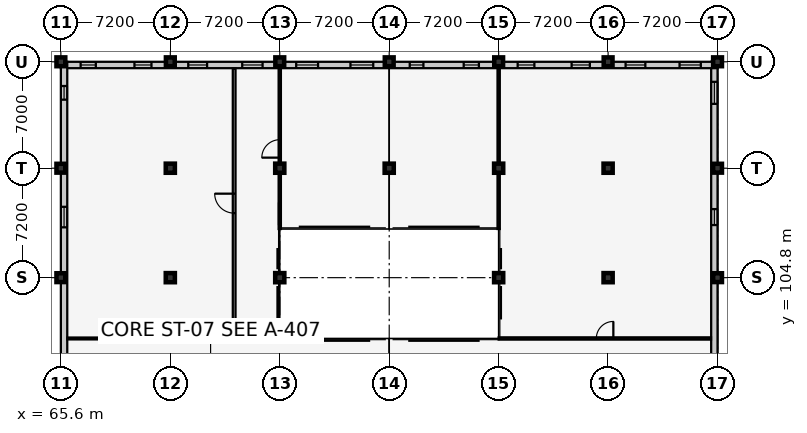
"""IFC4 building model, lengths in metres.
Left out: names, types, materials, properties, quantities, classifications, styles, units other than length and angle.
Written with IfcOpenShell. Run it as: python <this file> out.ifc"""

import sys

from ifc_helpers import new_model, si_unit, direction, frame, frame_2d, origin, origin_2d, place, context, subcontext, project, spatial, rectangle, extrude, element, fill, save


model = new_model("IFC4")
c1 = context("Model", 3, precision=1e-05, world=origin(), true_north=direction((0.0, 1.0)))
c2 = subcontext(c1, "Body", "Model", "MODEL_VIEW")
j1 = project(units=[si_unit("LENGTHUNIT", "METRE"), si_unit("PLANEANGLEUNIT", "RADIAN")], contexts=[c1])
p1 = place(None, origin())
s1 = spatial("IfcSite", under=j1, at=p1, CompositionType="ELEMENT")
p2 = place(p1, origin())
s2 = spatial("IfcBuilding", under=s1, at=p2, CompositionType="ELEMENT")
p3 = place(p2, frame((0.0, 0.0, 9.6)))
s3 = spatial("IfcBuildingStorey", under=s2, at=p3, CompositionType="ELEMENT", Elevation=9.6)
for number, where, z_axis, x_axis in (
    (1, (65.6, 104.8, 0.0), (0.0, 0.0, 1.0), (1.0, 0.0, 0.0)),
    (2, (65.6, 112.0, 0.0), (0.0, 0.0, 1.0), (1.0, 0.0, 0.0)),
    (3, (65.6, 119.0, 0.0), (0.0, 0.0, 1.0), (1.0, 0.0, 0.0)),
):
    element("IfcColumn", number, at=place(p3, frame(where, z_axis=z_axis, x_axis=x_axis)), inside=s3, PredefinedType="COLUMN", context=c2, shape_type="SweptSolid", body=[
        extrude(rectangle(XDim=0.58, YDim=0.58, at=origin_2d()), origin(), (0.0, 0.0, 1.0), 4.2),
    ])
for number, where, z_axis, x_axis in (
    (4, (72.8, 104.8, 0.0), (0.0, 0.0, 1.0), (1.0, 0.0, 0.0)),
    (5, (72.8, 112.0, 0.0), (0.0, 0.0, 1.0), (1.0, 0.0, 0.0)),
):
    element("IfcColumn", number, at=place(p3, frame(where, z_axis=z_axis, x_axis=x_axis)), inside=s3, PredefinedType="COLUMN", context=c2, shape_type="SweptSolid", body=[
        extrude(rectangle(XDim=0.6, YDim=0.6, at=origin_2d()), origin(), (0.0, 0.0, 1.0), 4.2),
    ])
p4 = place(p3, frame((72.8, 119.0, 0.0), z_axis=(0.0, 0.0, 1.0), x_axis=(1.0, 0.0, 0.0)))
e6 = element("IfcColumn", 6, at=p4, inside=s3, PredefinedType="COLUMN", context=c2, shape_type="SweptSolid", body=[
    extrude(rectangle(XDim=0.58, YDim=0.58, at=origin_2d()), origin(), (0.0, 0.0, 1.0), 4.2),
])
for number, where, z_axis, x_axis in (
    (7, (80.0, 104.8, 0.0), (0.0, 0.0, 1.0), (1.0, 0.0, 0.0)),
    (8, (80.0, 112.0, 0.0), (0.0, 0.0, 1.0), (1.0, 0.0, 0.0)),
):
    element("IfcColumn", number, at=place(p3, frame(where, z_axis=z_axis, x_axis=x_axis)), inside=s3, PredefinedType="COLUMN", context=c2, shape_type="SweptSolid", body=[
        extrude(rectangle(XDim=0.6, YDim=0.6, at=origin_2d()), origin(), (0.0, 0.0, 1.0), 4.2),
    ])
p5 = place(p3, frame((80.0, 119.0, 0.0), z_axis=(0.0, 0.0, 1.0), x_axis=(1.0, 0.0, 0.0)))
e9 = element("IfcColumn", 9, at=p5, inside=s3, PredefinedType="COLUMN", context=c2, shape_type="SweptSolid", body=[
    extrude(rectangle(XDim=0.58, YDim=0.58, at=origin_2d()), origin(), (0.0, 0.0, 1.0), 4.2),
])
p6 = place(p3, frame((87.2, 112.0, 0.0), z_axis=(0.0, 0.0, 1.0), x_axis=(1.0, 0.0, 0.0)))
e10 = element("IfcColumn", 10, at=p6, inside=s3, PredefinedType="COLUMN", context=c2, shape_type="SweptSolid", body=[
    extrude(rectangle(XDim=0.6, YDim=0.6, at=origin_2d()), origin(), (0.0, 0.0, 1.0), 4.2),
])
p7 = place(p3, frame((87.2, 119.0, 0.0), z_axis=(0.0, 0.0, 1.0), x_axis=(1.0, 0.0, 0.0)))
e11 = element("IfcColumn", 11, at=p7, inside=s3, PredefinedType="COLUMN", context=c2, shape_type="SweptSolid", body=[
    extrude(rectangle(XDim=0.58, YDim=0.58, at=origin_2d()), origin(), (0.0, 0.0, 1.0), 4.2),
])
for number, where, z_axis, x_axis in (
    (12, (94.4, 104.8, 0.0), (0.0, 0.0, 1.0), (1.0, 0.0, 0.0)),
    (13, (94.4, 112.0, 0.0), (0.0, 0.0, 1.0), (1.0, 0.0, 0.0)),
):
    element("IfcColumn", number, at=place(p3, frame(where, z_axis=z_axis, x_axis=x_axis)), inside=s3, PredefinedType="COLUMN", context=c2, shape_type="SweptSolid", body=[
        extrude(rectangle(XDim=0.6, YDim=0.6, at=origin_2d()), origin(), (0.0, 0.0, 1.0), 4.2),
    ])
p8 = place(p3, frame((94.4, 119.0, 0.0), z_axis=(0.0, 0.0, 1.0), x_axis=(1.0, 0.0, 0.0)))
e14 = element("IfcColumn", 14, at=p8, inside=s3, PredefinedType="COLUMN", context=c2, shape_type="SweptSolid", body=[
    extrude(rectangle(XDim=0.58, YDim=0.58, at=origin_2d()), origin(), (0.0, 0.0, 1.0), 4.2),
])
for number, where, z_axis, x_axis in (
    (15, (101.6, 104.8, 0.0), (0.0, 0.0, 1.0), (1.0, 0.0, 0.0)),
    (16, (101.6, 112.0, 0.0), (0.0, 0.0, 1.0), (1.0, 0.0, 0.0)),
):
    element("IfcColumn", number, at=place(p3, frame(where, z_axis=z_axis, x_axis=x_axis)), inside=s3, PredefinedType="COLUMN", context=c2, shape_type="SweptSolid", body=[
        extrude(rectangle(XDim=0.6, YDim=0.6, at=origin_2d()), origin(), (0.0, 0.0, 1.0), 4.2),
    ])
for number, where, z_axis, x_axis in (
    (17, (101.6, 119.0, 0.0), (0.0, 0.0, 1.0), (1.0, 0.0, 0.0)),
    (18, (108.8, 104.8, 0.0), (0.0, 0.0, 1.0), (1.0, 0.0, 0.0)),
    (19, (108.8, 112.0, 0.0), (0.0, 0.0, 1.0), (1.0, 0.0, 0.0)),
    (20, (108.8, 119.0, 0.0), (0.0, 0.0, 1.0), (1.0, 0.0, 0.0)),
):
    element("IfcColumn", number, at=place(p3, frame(where, z_axis=z_axis, x_axis=x_axis)), inside=s3, PredefinedType="COLUMN", context=c2, shape_type="SweptSolid", body=[
        extrude(rectangle(XDim=0.58, YDim=0.58, at=origin_2d()), origin(), (0.0, 0.0, 1.0), 4.2),
    ])
p9 = place(p3, frame((108.59, 119.0, 0.0), z_axis=(0.0, 0.0, 1.0), x_axis=(0.0, -1.0, 0.0)))
e21 = element("IfcWall", 21, at=p9, inside=s3, PredefinedType="SOLIDWALL", context=c2, shape_type="SweptSolid", body=[
    extrude(rectangle(XDim=28.6, YDim=0.42, at=frame_2d((14.3, 0.0))), origin(), (0.0, 0.0, 1.0), 3.345),
])
p10 = place(p9, frame((1.318, 0.0, 0.9)))
e22 = element("IfcOpeningElement", 22, at=p10, cuts=e21, PredefinedType="OPENING", context=c2, shape_type="SweptSolid", body=[
    extrude(rectangle(XDim=1.45, YDim=1.45, at=frame_2d((0.725, 0.725))), frame((0.0, 0.222, 0.0), z_axis=(0.0, -1.0, 0.0), x_axis=(1.0, 0.0, 0.0)), (0.0, 0.0, 1.0), 0.444),
])
p11 = place(p9, frame((9.689, 0.0, 0.9)))
e23 = element("IfcOpeningElement", 23, at=p11, cuts=e21, PredefinedType="OPENING", context=c2, shape_type="SweptSolid", body=[
    extrude(rectangle(XDim=1.05, YDim=1.6, at=frame_2d((0.525, 0.8))), frame((0.0, 0.222, 0.0), z_axis=(0.0, -1.0, 0.0), x_axis=(1.0, 0.0, 0.0)), (0.0, 0.0, 1.0), 0.444),
])
p12 = place(p9, frame((25.807, 0.0, 0.9)))
e24 = element("IfcOpeningElement", 24, at=p12, cuts=e21, PredefinedType="OPENING", context=c2, shape_type="SweptSolid", body=[
    extrude(rectangle(XDim=1.5, YDim=1.6, at=frame_2d((0.75, 0.8))), frame((0.0, 0.222, 0.0), z_axis=(0.0, -1.0, 0.0), x_axis=(1.0, 0.0, 0.0)), (0.0, 0.0, 1.0), 0.444),
])
p13 = place(p3, frame((65.6, 118.79, 0.0), z_axis=(0.0, 0.0, 1.0), x_axis=(1.0, 0.0, 0.0)))
e25 = element("IfcWall", 25, at=p13, inside=s3, PredefinedType="SOLIDWALL", context=c2, shape_type="SweptSolid", body=[
    extrude(rectangle(XDim=43.2, YDim=0.42, at=frame_2d((21.6, 0.0))), origin(), (0.0, 0.0, 1.0), 3.245),
])
p14 = place(p13, frame((1.3, 0.0, 0.9)))
e26 = element("IfcOpeningElement", 26, at=p14, cuts=e25, PredefinedType="OPENING", context=c2, shape_type="SweptSolid", body=[
    extrude(rectangle(XDim=1.0, YDim=1.75, at=frame_2d((0.5, 0.875))), frame((0.0, 0.222, 0.0), z_axis=(0.0, -1.0, 0.0), x_axis=(1.0, 0.0, 0.0)), (0.0, 0.0, 1.0), 0.444),
])
p15 = place(p13, frame((4.84, 0.0, 0.9)))
e27 = element("IfcOpeningElement", 27, at=p15, cuts=e25, PredefinedType="OPENING", context=c2, shape_type="SweptSolid", body=[
    extrude(rectangle(XDim=1.12, YDim=1.75, at=frame_2d((0.56, 0.875))), frame((0.0, 0.222, 0.0), z_axis=(0.0, -1.0, 0.0), x_axis=(1.0, 0.0, 0.0)), (0.0, 0.0, 1.0), 0.444),
])
p16 = place(p13, frame((8.38, 0.0, 0.9)))
e28 = element("IfcOpeningElement", 28, at=p16, cuts=e25, PredefinedType="OPENING", context=c2, shape_type="SweptSolid", body=[
    extrude(rectangle(XDim=1.24, YDim=1.75, at=frame_2d((0.62, 0.875))), frame((0.0, 0.222, 0.0), z_axis=(0.0, -1.0, 0.0), x_axis=(1.0, 0.0, 0.0)), (0.0, 0.0, 1.0), 0.444),
])
p17 = place(p13, frame((11.93, 0.0, 0.9)))
e29 = element("IfcOpeningElement", 29, at=p17, cuts=e25, PredefinedType="OPENING", context=c2, shape_type="SweptSolid", body=[
    extrude(rectangle(XDim=1.34, YDim=1.75, at=frame_2d((0.67, 0.875))), frame((0.0, 0.222, 0.0), z_axis=(0.0, -1.0, 0.0), x_axis=(1.0, 0.0, 0.0)), (0.0, 0.0, 1.0), 0.444),
])
p18 = place(p13, frame((15.48, 0.0, 0.9)))
e30 = element("IfcOpeningElement", 30, at=p18, cuts=e25, PredefinedType="OPENING", context=c2, shape_type="SweptSolid", body=[
    extrude(rectangle(XDim=1.44, YDim=1.75, at=frame_2d((0.72, 0.875))), frame((0.0, 0.222, 0.0), z_axis=(0.0, -1.0, 0.0), x_axis=(1.0, 0.0, 0.0)), (0.0, 0.0, 1.0), 0.444),
])
p19 = place(p13, frame((19.05, 0.0, 0.9)))
e31 = element("IfcOpeningElement", 31, at=p19, cuts=e25, PredefinedType="OPENING", context=c2, shape_type="SweptSolid", body=[
    extrude(rectangle(XDim=1.5, YDim=1.75, at=frame_2d((0.75, 0.875))), frame((0.0, 0.222, 0.0), z_axis=(0.0, -1.0, 0.0), x_axis=(1.0, 0.0, 0.0)), (0.0, 0.0, 1.0), 0.444),
])
p20 = place(p13, frame((22.95, 0.0, 0.9)))
e32 = element("IfcOpeningElement", 32, at=p20, cuts=e25, PredefinedType="OPENING", context=c2, shape_type="SweptSolid", body=[
    extrude(rectangle(XDim=0.9, YDim=1.35, at=frame_2d((0.45, 0.675))), frame((0.0, 0.222, 0.0), z_axis=(0.0, -1.0, 0.0), x_axis=(1.0, 0.0, 0.0)), (0.0, 0.0, 1.0), 0.444),
])
p21 = place(p13, frame((26.5, 0.0, 0.9)))
e33 = element("IfcOpeningElement", 33, at=p21, cuts=e25, PredefinedType="OPENING", context=c2, shape_type="SweptSolid", body=[
    extrude(rectangle(XDim=1.0, YDim=1.35, at=frame_2d((0.5, 0.675))), frame((0.0, 0.222, 0.0), z_axis=(0.0, -1.0, 0.0), x_axis=(1.0, 0.0, 0.0)), (0.0, 0.0, 1.0), 0.444),
])
p22 = place(p13, frame((30.05, 0.0, 0.9)))
e34 = element("IfcOpeningElement", 34, at=p22, cuts=e25, PredefinedType="OPENING", context=c2, shape_type="SweptSolid", body=[
    extrude(rectangle(XDim=1.1, YDim=1.35, at=frame_2d((0.55, 0.675))), frame((0.0, 0.222, 0.0), z_axis=(0.0, -1.0, 0.0), x_axis=(1.0, 0.0, 0.0)), (0.0, 0.0, 1.0), 0.444),
])
p23 = place(p13, frame((33.6, 0.0, 0.9)))
e35 = element("IfcOpeningElement", 35, at=p23, cuts=e25, PredefinedType="OPENING", context=c2, shape_type="SweptSolid", body=[
    extrude(rectangle(XDim=1.2, YDim=1.35, at=frame_2d((0.6, 0.675))), frame((0.0, 0.222, 0.0), z_axis=(0.0, -1.0, 0.0), x_axis=(1.0, 0.0, 0.0)), (0.0, 0.0, 1.0), 0.444),
])
p24 = place(p13, frame((37.15, 0.0, 0.9)))
e36 = element("IfcOpeningElement", 36, at=p24, cuts=e25, PredefinedType="OPENING", context=c2, shape_type="SweptSolid", body=[
    extrude(rectangle(XDim=1.3, YDim=1.35, at=frame_2d((0.65, 0.675))), frame((0.0, 0.222, 0.0), z_axis=(0.0, -1.0, 0.0), x_axis=(1.0, 0.0, 0.0)), (0.0, 0.0, 1.0), 0.444),
])
p25 = place(p13, frame((40.7, 0.0, 0.9)))
e37 = element("IfcOpeningElement", 37, at=p25, cuts=e25, PredefinedType="OPENING", context=c2, shape_type="SweptSolid", body=[
    extrude(rectangle(XDim=1.4, YDim=1.35, at=frame_2d((0.7, 0.675))), frame((0.0, 0.222, 0.0), z_axis=(0.0, -1.0, 0.0), x_axis=(1.0, 0.0, 0.0)), (0.0, 0.0, 1.0), 0.444),
])
p26 = place(p3, frame((65.81, 90.4, 0.0), z_axis=(0.0, 0.0, 1.0), x_axis=(0.0, 1.0, 0.0)))
e38 = element("IfcWall", 38, at=p26, inside=s3, PredefinedType="SOLIDWALL", context=c2, shape_type="SweptSolid", body=[
    extrude(rectangle(XDim=28.6, YDim=0.42, at=frame_2d((14.3, 0.0))), origin(), (0.0, 0.0, 1.0), 3.315),
])
p27 = place(p26, frame((1.568, 0.0, 0.9)))
e39 = element("IfcOpeningElement", 39, at=p27, cuts=e38, PredefinedType="OPENING", context=c2, shape_type="SweptSolid", body=[
    extrude(rectangle(XDim=0.95, YDim=1.45, at=frame_2d((0.475, 0.725))), frame((0.0, 0.222, 0.0), z_axis=(0.0, -1.0, 0.0), x_axis=(1.0, 0.0, 0.0)), (0.0, 0.0, 1.0), 0.444),
])
p28 = place(p26, frame((17.711, 0.0, 0.9)))
e40 = element("IfcOpeningElement", 40, at=p28, cuts=e38, PredefinedType="OPENING", context=c2, shape_type="SweptSolid", body=[
    extrude(rectangle(XDim=1.35, YDim=1.45, at=frame_2d((0.675, 0.725))), frame((0.0, 0.222, 0.0), z_axis=(0.0, -1.0, 0.0), x_axis=(1.0, 0.0, 0.0)), (0.0, 0.0, 1.0), 0.444),
])
p29 = place(p26, frame((26.107, 0.0, 0.9)))
e41 = element("IfcOpeningElement", 41, at=p29, cuts=e38, PredefinedType="OPENING", context=c2, shape_type="SweptSolid", body=[
    extrude(rectangle(XDim=0.9, YDim=1.6, at=frame_2d((0.45, 0.8))), frame((0.0, 0.222, 0.0), z_axis=(0.0, -1.0, 0.0), x_axis=(1.0, 0.0, 0.0)), (0.0, 0.0, 1.0), 0.444),
])
p30 = place(p3, frame((77.0, 100.8, 0.0), z_axis=(0.0, 0.0, 1.0), x_axis=(0.0, 1.0, 0.0)))
e42 = element("IfcWall", 42, at=p30, inside=s3, PredefinedType="PARTITIONING", context=c2, shape_type="SweptSolid", body=[
    extrude(rectangle(XDim=17.77, YDim=0.18, at=frame_2d((8.885, 0.0))), origin(), (0.0, 0.0, 1.0), 3.92),
])
p31 = place(p30, frame((8.245, 0.0, 0.0)))
e43 = element("IfcOpeningElement", 43, at=p31, cuts=e42, PredefinedType="OPENING", context=c2, shape_type="SweptSolid", body=[
    extrude(rectangle(XDim=1.28, YDim=2.2, at=frame_2d((0.64, 1.1))), frame((0.0, 0.102, 0.0), z_axis=(0.0, -1.0, 0.0), x_axis=(1.0, 0.0, 0.0)), (0.0, 0.0, 1.0), 0.204),
])
p32 = place(p3, frame((66.03, 100.8, 0.0), z_axis=(0.0, 0.0, 1.0), x_axis=(1.0, 0.0, 0.0)))
e44 = element("IfcWall", 44, at=p32, inside=s3, PredefinedType="PARTITIONING", context=c2, shape_type="SweptSolid", body=[
    extrude(rectangle(XDim=10.87, YDim=0.125, at=frame_2d((5.435, 0.0))), origin(), (0.0, 0.0, 1.0), 3.92),
])
p33 = place(p3, frame((80.0, 108.0, 0.0), z_axis=(0.0, 0.0, 1.0), x_axis=(0.0, 1.0, 0.0)))
e45 = element("IfcWall", 45, at=p33, inside=s3, PredefinedType="PARTITIONING", context=c2, shape_type="SweptSolid", body=[
    extrude(rectangle(XDim=10.57, YDim=0.15, at=frame_2d((5.285, 0.0))), origin(), (0.0, 0.0, 1.0), 3.295),
])
p34 = place(p33, frame((4.695, 0.0, 0.0)))
e46 = element("IfcOpeningElement", 46, at=p34, cuts=e45, PredefinedType="OPENING", context=c2, shape_type="SweptSolid", body=[
    extrude(rectangle(XDim=1.18, YDim=2.2, at=frame_2d((0.59, 1.1))), frame((0.0, 0.087, 0.0), z_axis=(0.0, -1.0, 0.0), x_axis=(1.0, 0.0, 0.0)), (0.0, 0.0, 1.0), 0.174),
])
p35 = place(p33, frame((0.25, 0.0, 1.0)))
e47 = element("IfcOpeningElement", 47, at=p35, cuts=e45, PredefinedType="OPENING", context=c2, shape_type="SweptSolid", body=[
    extrude(rectangle(XDim=1.5, YDim=1.2, at=frame_2d((0.75, 0.6))), frame((0.0, 0.087, 0.0), z_axis=(0.0, -1.0, 0.0), x_axis=(1.0, 0.0, 0.0)), (0.0, 0.0, 1.0), 0.174),
])
p36 = place(p3, frame((94.4, 108.0, 0.0), z_axis=(0.0, 0.0, 1.0), x_axis=(0.0, 1.0, 0.0)))
e48 = element("IfcWall", 48, at=p36, inside=s3, PredefinedType="PARTITIONING", context=c2, shape_type="SweptSolid", body=[
    extrude(rectangle(XDim=10.57, YDim=0.15, at=frame_2d((5.285, 0.0))), origin(), (0.0, 0.0, 1.0), 3.295),
])
p37 = place(p3, frame((94.4, 100.8, 0.0), z_axis=(0.0, 0.0, 1.0), x_axis=(1.0, 0.0, 0.0)))
e49 = element("IfcWall", 49, at=p37, inside=s3, PredefinedType="PARTITIONING", context=c2, shape_type="SweptSolid", body=[
    extrude(rectangle(XDim=13.97, YDim=0.15, at=frame_2d((6.985, 0.0))), origin(), (0.0, 0.0, 1.0), 3.92),
])
p38 = place(p37, frame((6.425, 0.0, 0.0)))
e50 = element("IfcOpeningElement", 50, at=p38, cuts=e49, PredefinedType="OPENING", context=c2, shape_type="SweptSolid", body=[
    extrude(rectangle(XDim=1.12, YDim=2.15, at=frame_2d((0.56, 1.075))), frame((0.0, 0.087, 0.0), z_axis=(0.0, -1.0, 0.0), x_axis=(1.0, 0.0, 0.0)), (0.0, 0.0, 1.0), 0.174),
])
p39 = place(p10, origin())
e51 = element("IfcWindow", 51, at=p39, inside=s3, PartitioningType="SINGLE_PANEL", PredefinedType="WINDOW", context=c2, shape_type="SweptSolid", body=[
    extrude(rectangle(XDim=1.45, YDim=1.45, at=frame_2d((0.725, 0.725))), frame((0.0, 0.03, 0.0), z_axis=(0.0, -1.0, 0.0), x_axis=(1.0, 0.0, 0.0)), (0.0, 0.0, 1.0), 0.06),
])
fill(e22, e51)
p40 = place(p11, origin())
e52 = element("IfcWindow", 52, at=p40, inside=s3, PartitioningType="SINGLE_PANEL", PredefinedType="WINDOW", context=c2, shape_type="SweptSolid", body=[
    extrude(rectangle(XDim=1.05, YDim=1.6, at=frame_2d((0.525, 0.8))), frame((0.0, 0.03, 0.0), z_axis=(0.0, -1.0, 0.0), x_axis=(1.0, 0.0, 0.0)), (0.0, 0.0, 1.0), 0.06),
])
fill(e23, e52)
p41 = place(p14, origin())
e53 = element("IfcWindow", 53, at=p41, inside=s3, PartitioningType="SINGLE_PANEL", PredefinedType="WINDOW", context=c2, shape_type="SweptSolid", body=[
    extrude(rectangle(XDim=1.0, YDim=1.75, at=frame_2d((0.5, 0.875))), frame((0.0, 0.03, 0.0), z_axis=(0.0, -1.0, 0.0), x_axis=(1.0, 0.0, 0.0)), (0.0, 0.0, 1.0), 0.06),
])
fill(e26, e53)
p42 = place(p15, origin())
e54 = element("IfcWindow", 54, at=p42, inside=s3, PartitioningType="SINGLE_PANEL", PredefinedType="WINDOW", context=c2, shape_type="SweptSolid", body=[
    extrude(rectangle(XDim=1.12, YDim=1.75, at=frame_2d((0.56, 0.875))), frame((0.0, 0.03, 0.0), z_axis=(0.0, -1.0, 0.0), x_axis=(1.0, 0.0, 0.0)), (0.0, 0.0, 1.0), 0.06),
])
fill(e27, e54)
p43 = place(p16, origin())
e55 = element("IfcWindow", 55, at=p43, inside=s3, PartitioningType="SINGLE_PANEL", PredefinedType="WINDOW", context=c2, shape_type="SweptSolid", body=[
    extrude(rectangle(XDim=1.24, YDim=1.75, at=frame_2d((0.62, 0.875))), frame((0.0, 0.03, 0.0), z_axis=(0.0, -1.0, 0.0), x_axis=(1.0, 0.0, 0.0)), (0.0, 0.0, 1.0), 0.06),
])
fill(e28, e55)
p44 = place(p17, origin())
e56 = element("IfcWindow", 56, at=p44, inside=s3, PartitioningType="SINGLE_PANEL", PredefinedType="WINDOW", context=c2, shape_type="SweptSolid", body=[
    extrude(rectangle(XDim=1.34, YDim=1.75, at=frame_2d((0.67, 0.875))), frame((0.0, 0.03, 0.0), z_axis=(0.0, -1.0, 0.0), x_axis=(1.0, 0.0, 0.0)), (0.0, 0.0, 1.0), 0.06),
])
fill(e29, e56)
p45 = place(p18, origin())
e57 = element("IfcWindow", 57, at=p45, inside=s3, PartitioningType="SINGLE_PANEL", PredefinedType="WINDOW", context=c2, shape_type="SweptSolid", body=[
    extrude(rectangle(XDim=1.44, YDim=1.75, at=frame_2d((0.72, 0.875))), frame((0.0, 0.03, 0.0), z_axis=(0.0, -1.0, 0.0), x_axis=(1.0, 0.0, 0.0)), (0.0, 0.0, 1.0), 0.06),
])
fill(e30, e57)
p46 = place(p19, origin())
e58 = element("IfcWindow", 58, at=p46, inside=s3, PartitioningType="SINGLE_PANEL", PredefinedType="WINDOW", context=c2, shape_type="SweptSolid", body=[
    extrude(rectangle(XDim=1.5, YDim=1.75, at=frame_2d((0.75, 0.875))), frame((0.0, 0.03, 0.0), z_axis=(0.0, -1.0, 0.0), x_axis=(1.0, 0.0, 0.0)), (0.0, 0.0, 1.0), 0.06),
])
fill(e31, e58)
p47 = place(p20, origin())
e59 = element("IfcWindow", 59, at=p47, inside=s3, PartitioningType="SINGLE_PANEL", PredefinedType="WINDOW", context=c2, shape_type="SweptSolid", body=[
    extrude(rectangle(XDim=0.9, YDim=1.35, at=frame_2d((0.45, 0.675))), frame((0.0, 0.03, 0.0), z_axis=(0.0, -1.0, 0.0), x_axis=(1.0, 0.0, 0.0)), (0.0, 0.0, 1.0), 0.06),
])
fill(e32, e59)
p48 = place(p21, origin())
e60 = element("IfcWindow", 60, at=p48, inside=s3, PartitioningType="SINGLE_PANEL", PredefinedType="WINDOW", context=c2, shape_type="SweptSolid", body=[
    extrude(rectangle(XDim=1.0, YDim=1.35, at=frame_2d((0.5, 0.675))), frame((0.0, 0.03, 0.0), z_axis=(0.0, -1.0, 0.0), x_axis=(1.0, 0.0, 0.0)), (0.0, 0.0, 1.0), 0.06),
])
fill(e33, e60)
p49 = place(p22, origin())
e61 = element("IfcWindow", 61, at=p49, inside=s3, PartitioningType="SINGLE_PANEL", PredefinedType="WINDOW", context=c2, shape_type="SweptSolid", body=[
    extrude(rectangle(XDim=1.1, YDim=1.35, at=frame_2d((0.55, 0.675))), frame((0.0, 0.03, 0.0), z_axis=(0.0, -1.0, 0.0), x_axis=(1.0, 0.0, 0.0)), (0.0, 0.0, 1.0), 0.06),
])
fill(e34, e61)
p50 = place(p23, origin())
e62 = element("IfcWindow", 62, at=p50, inside=s3, PartitioningType="SINGLE_PANEL", PredefinedType="WINDOW", context=c2, shape_type="SweptSolid", body=[
    extrude(rectangle(XDim=1.2, YDim=1.35, at=frame_2d((0.6, 0.675))), frame((0.0, 0.03, 0.0), z_axis=(0.0, -1.0, 0.0), x_axis=(1.0, 0.0, 0.0)), (0.0, 0.0, 1.0), 0.06),
])
fill(e35, e62)
p51 = place(p24, origin())
e63 = element("IfcWindow", 63, at=p51, inside=s3, PartitioningType="SINGLE_PANEL", PredefinedType="WINDOW", context=c2, shape_type="SweptSolid", body=[
    extrude(rectangle(XDim=1.3, YDim=1.35, at=frame_2d((0.65, 0.675))), frame((0.0, 0.03, 0.0), z_axis=(0.0, -1.0, 0.0), x_axis=(1.0, 0.0, 0.0)), (0.0, 0.0, 1.0), 0.06),
])
fill(e36, e63)
p52 = place(p25, origin())
e64 = element("IfcWindow", 64, at=p52, inside=s3, PartitioningType="SINGLE_PANEL", PredefinedType="WINDOW", context=c2, shape_type="SweptSolid", body=[
    extrude(rectangle(XDim=1.4, YDim=1.35, at=frame_2d((0.7, 0.675))), frame((0.0, 0.03, 0.0), z_axis=(0.0, -1.0, 0.0), x_axis=(1.0, 0.0, 0.0)), (0.0, 0.0, 1.0), 0.06),
])
fill(e37, e64)
p53 = place(p28, origin())
e65 = element("IfcWindow", 65, at=p53, inside=s3, PartitioningType="SINGLE_PANEL", PredefinedType="WINDOW", context=c2, shape_type="SweptSolid", body=[
    extrude(rectangle(XDim=1.35, YDim=1.45, at=frame_2d((0.675, 0.725))), frame((0.0, 0.03, 0.0), z_axis=(0.0, -1.0, 0.0), x_axis=(1.0, 0.0, 0.0)), (0.0, 0.0, 1.0), 0.06),
])
fill(e40, e65)
p54 = place(p29, origin())
e66 = element("IfcWindow", 66, at=p54, inside=s3, PartitioningType="SINGLE_PANEL", PredefinedType="WINDOW", context=c2, shape_type="SweptSolid", body=[
    extrude(rectangle(XDim=0.9, YDim=1.6, at=frame_2d((0.45, 0.8))), frame((0.0, 0.03, 0.0), z_axis=(0.0, -1.0, 0.0), x_axis=(1.0, 0.0, 0.0)), (0.0, 0.0, 1.0), 0.06),
])
fill(e41, e66)
p55 = place(p31, origin())
e67 = element("IfcDoor", 67, at=p55, inside=s3, OperationType="SINGLE_SWING_RIGHT", PredefinedType="DOOR", context=c2, shape_type="SweptSolid", body=[
    extrude(rectangle(XDim=1.28, YDim=2.2, at=frame_2d((0.64, 1.1))), frame((0.0, 0.025, 0.0), z_axis=(0.0, -1.0, 0.0), x_axis=(1.0, 0.0, 0.0)), (0.0, 0.0, 1.0), 0.05),
])
fill(e43, e67)
p56 = place(p34, origin())
e68 = element("IfcDoor", 68, at=p56, inside=s3, OperationType="SINGLE_SWING_LEFT", PredefinedType="DOOR", context=c2, shape_type="SweptSolid", body=[
    extrude(rectangle(XDim=1.18, YDim=2.2, at=frame_2d((0.59, 1.1))), frame((0.0, 0.025, 0.0), z_axis=(0.0, -1.0, 0.0), x_axis=(1.0, 0.0, 0.0)), (0.0, 0.0, 1.0), 0.05),
])
fill(e46, e68)
p57 = place(p35, origin())
e69 = element("IfcWindow", 69, at=p57, inside=s3, PartitioningType="SINGLE_PANEL", PredefinedType="WINDOW", context=c2, shape_type="SweptSolid", body=[
    extrude(rectangle(XDim=1.5, YDim=1.2, at=frame_2d((0.75, 0.6))), frame((0.0, 0.03, 0.0), z_axis=(0.0, -1.0, 0.0), x_axis=(1.0, 0.0, 0.0)), (0.0, 0.0, 1.0), 0.06),
])
fill(e47, e69)
p58 = place(p38, origin())
e70 = element("IfcDoor", 70, at=p58, inside=s3, OperationType="SINGLE_SWING_RIGHT", PredefinedType="DOOR", context=c2, shape_type="SweptSolid", body=[
    extrude(rectangle(XDim=1.12, YDim=2.15, at=frame_2d((0.56, 1.075))), frame((0.0, 0.025, 0.0), z_axis=(0.0, -1.0, 0.0), x_axis=(1.0, 0.0, 0.0)), (0.0, 0.0, 1.0), 0.05),
])
fill(e50, e70)
save(model, sys.argv[1])
